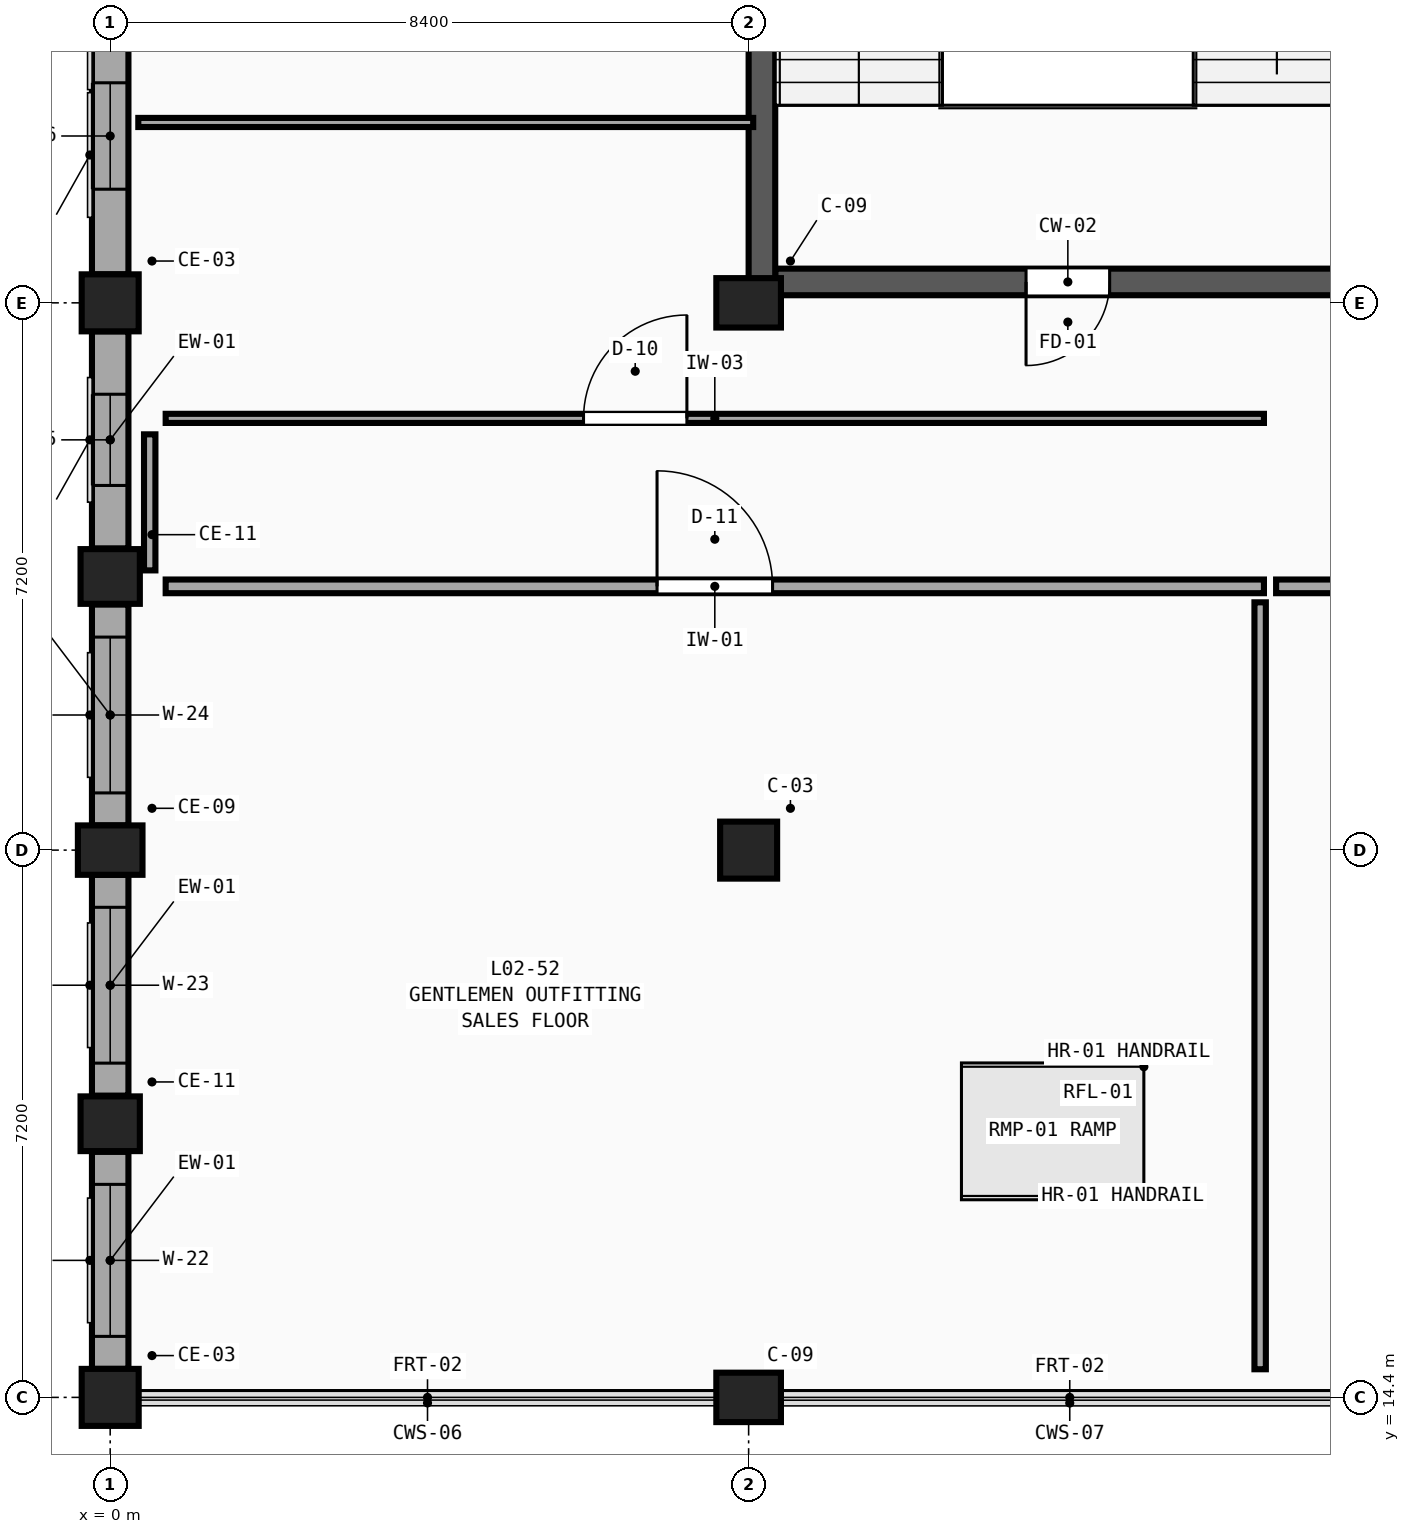
"""IFC4 building model, lengths in metres.
Left out: names, types, materials, properties, quantities, classifications, styles, units other than length and angle.
Written with IfcOpenShell. Run it as: python <this file> out.ifc"""

import sys

from ifc_helpers import new_model, si_unit, direction, frame, frame_2d, origin, origin_2d, place, context, subcontext, project, spatial, rectangle, extrude, element, fill, save


model = new_model("IFC4")
c1 = context("Model", 3, precision=1e-05, world=origin(), true_north=direction((0.0, 1.0)))
c2 = subcontext(c1, "Body", "Model", "MODEL_VIEW")
j1 = project(units=[si_unit("LENGTHUNIT", "METRE"), si_unit("PLANEANGLEUNIT", "RADIAN")], contexts=[c1])
p1 = place(None, origin())
s1 = spatial("IfcSite", under=j1, at=p1, CompositionType="ELEMENT")
p2 = place(p1, origin())
s2 = spatial("IfcBuilding", under=s1, at=p2, CompositionType="ELEMENT")
p3 = place(p2, frame((0.0, 0.0, 9.9)))
s3 = spatial("IfcBuildingStorey", under=s2, at=p3, CompositionType="ELEMENT", Elevation=9.9)
p4 = place(p3, frame((0.0, 14.4, 0.0), z_axis=(0.0, 0.0, 1.0), x_axis=(1.0, 0.0, 0.0)))
e1 = element("IfcColumn", 1, at=p4, inside=s3, PredefinedType="COLUMN", context=c2, shape_type="SweptSolid", body=[
    extrude(rectangle(XDim=0.75, YDim=0.75, at=origin_2d()), origin(), (0.0, 0.0, 1.0), 4.5),
])
p5 = place(p3, frame((0.0, 21.6, 0.0), z_axis=(0.0, 0.0, 1.0), x_axis=(1.0, 0.0, 0.0)))
e2 = element("IfcColumn", 2, at=p5, inside=s3, PredefinedType="COLUMN", context=c2, shape_type="SweptSolid", body=[
    extrude(rectangle(XDim=0.85, YDim=0.65, at=origin_2d()), origin(), (0.0, 0.0, 1.0), 4.5),
])
p6 = place(p3, frame((0.0, 28.8, 0.0), z_axis=(0.0, 0.0, 1.0), x_axis=(1.0, 0.0, 0.0)))
e3 = element("IfcColumn", 3, at=p6, inside=s3, PredefinedType="COLUMN", context=c2, shape_type="SweptSolid", body=[
    extrude(rectangle(XDim=0.75, YDim=0.75, at=origin_2d()), origin(), (0.0, 0.0, 1.0), 4.5),
])
p7 = place(p3, frame((8.4, 14.4, 0.0), z_axis=(0.0, 0.0, 1.0), x_axis=(1.0, 0.0, 0.0)))
e4 = element("IfcColumn", 4, at=p7, inside=s3, PredefinedType="COLUMN", context=c2, shape_type="SweptSolid", body=[
    extrude(rectangle(XDim=0.85, YDim=0.65, at=origin_2d()), origin(), (0.0, 0.0, 1.0), 4.5),
])
p8 = place(p3, frame((8.4, 21.6, 0.0), z_axis=(0.0, 0.0, 1.0), x_axis=(1.0, 0.0, 0.0)))
e5 = element("IfcColumn", 5, at=p8, inside=s3, PredefinedType="COLUMN", context=c2, shape_type="SweptSolid", body=[
    extrude(rectangle(XDim=0.75, YDim=0.75, at=origin_2d()), origin(), (0.0, 0.0, 1.0), 4.5),
])
p9 = place(p3, frame((8.4, 28.8, 0.0), z_axis=(0.0, 0.0, 1.0), x_axis=(1.0, 0.0, 0.0)))
e6 = element("IfcColumn", 6, at=p9, inside=s3, PredefinedType="COLUMN", context=c2, shape_type="SweptSolid", body=[
    extrude(rectangle(XDim=0.85, YDim=0.65, at=origin_2d()), origin(), (0.0, 0.0, 1.0), 4.5),
])
for number, where, z_axis, x_axis in (
    (7, (0.0, 18.0, 0.0), (0.0, 0.0, 1.0), (1.0, 0.0, 0.0)),
    (8, (0.0, 25.2, 0.0), (0.0, 0.0, 1.0), (1.0, 0.0, 0.0)),
):
    element("IfcColumn", number, at=place(p3, frame(where, z_axis=z_axis, x_axis=x_axis)), inside=s3, PredefinedType="PILASTER", context=c2, shape_type="SweptSolid", body=[
        extrude(rectangle(XDim=0.78, YDim=0.72, at=origin_2d()), origin(), (0.0, 0.0, 1.0), 4.5),
    ])
p10 = place(p3, frame((0.0, 14.775, 0.0), z_axis=(0.0, 0.0, 1.0), x_axis=(0.0, 1.0, 0.0)))
e9 = element("IfcWall", 9, at=p10, inside=s3, PredefinedType="SOLIDWALL", context=c2, shape_type="SweptSolid", body=[
    extrude(rectangle(XDim=2.855, YDim=0.48, at=frame_2d((1.427, 0.0))), origin(), (0.0, 0.0, 1.0), 3.63),
])
p11 = place(p10, frame((0.427, 0.0, 0.75)))
e10 = element("IfcOpeningElement", 10, at=p11, cuts=e9, PredefinedType="OPENING", context=c2, shape_type="SweptSolid", body=[
    extrude(rectangle(XDim=2.0, YDim=2.26, at=frame_2d((1.0, 1.13))), frame((0.0, 0.26, 0.0), z_axis=(0.0, -1.0, 0.0), x_axis=(1.0, 0.0, 0.0)), (0.0, 0.0, 1.0), 0.52),
])
p12 = place(p3, frame((0.0, 18.37, 0.0), z_axis=(0.0, 0.0, 1.0), x_axis=(0.0, 1.0, 0.0)))
e11 = element("IfcWall", 11, at=p12, inside=s3, PredefinedType="SOLIDWALL", context=c2, shape_type="SweptSolid", body=[
    extrude(rectangle(XDim=2.905, YDim=0.48, at=frame_2d((1.452, 0.0))), origin(), (0.0, 0.0, 1.0), 3.63),
])
p13 = place(p12, frame((0.427, 0.0, 0.75)))
e12 = element("IfcOpeningElement", 12, at=p13, cuts=e11, PredefinedType="OPENING", context=c2, shape_type="SweptSolid", body=[
    extrude(rectangle(XDim=2.05, YDim=2.26, at=frame_2d((1.025, 1.13))), frame((0.0, 0.26, 0.0), z_axis=(0.0, -1.0, 0.0), x_axis=(1.0, 0.0, 0.0)), (0.0, 0.0, 1.0), 0.52),
])
p14 = place(p3, frame((0.0, 21.925, 0.0), z_axis=(0.0, 0.0, 1.0), x_axis=(0.0, 1.0, 0.0)))
e13 = element("IfcWall", 13, at=p14, inside=s3, PredefinedType="SOLIDWALL", context=c2, shape_type="SweptSolid", body=[
    extrude(rectangle(XDim=2.905, YDim=0.48, at=frame_2d((1.453, 0.0))), origin(), (0.0, 0.0, 1.0), 3.63),
])
p15 = place(p14, frame((0.427, 0.0, 0.75)))
e14 = element("IfcOpeningElement", 14, at=p15, cuts=e13, PredefinedType="OPENING", context=c2, shape_type="SweptSolid", body=[
    extrude(rectangle(XDim=2.05, YDim=2.26, at=frame_2d((1.025, 1.13))), frame((0.0, 0.26, 0.0), z_axis=(0.0, -1.0, 0.0), x_axis=(1.0, 0.0, 0.0)), (0.0, 0.0, 1.0), 0.52),
])
p16 = place(p3, frame((0.0, 25.57, 0.0), z_axis=(0.0, 0.0, 1.0), x_axis=(0.0, 1.0, 0.0)))
e15 = element("IfcWall", 15, at=p16, inside=s3, PredefinedType="SOLIDWALL", context=c2, shape_type="SweptSolid", body=[
    extrude(rectangle(XDim=2.855, YDim=0.48, at=frame_2d((1.427, 0.0))), origin(), (0.0, 0.0, 1.0), 3.63),
])
p17 = place(p16, frame((0.827, 0.0, 0.75)))
e16 = element("IfcOpeningElement", 16, at=p17, cuts=e15, PredefinedType="OPENING", context=c2, shape_type="SweptSolid", body=[
    extrude(rectangle(XDim=1.2, YDim=2.44, at=frame_2d((0.6, 1.22))), frame((0.0, 0.26, 0.0), z_axis=(0.0, -1.0, 0.0), x_axis=(1.0, 0.0, 0.0)), (0.0, 0.0, 1.0), 0.52),
])
p18 = place(p3, frame((0.0, 29.175, 0.0), z_axis=(0.0, 0.0, 1.0), x_axis=(0.0, 1.0, 0.0)))
e17 = element("IfcWall", 17, at=p18, inside=s3, PredefinedType="SOLIDWALL", context=c2, shape_type="SweptSolid", body=[
    extrude(rectangle(XDim=6.5, YDim=0.48, at=frame_2d((3.25, 0.0))), origin(), (0.0, 0.0, 1.0), 3.63),
])
p19 = place(p18, frame((1.12, 0.0, 0.75)))
e18 = element("IfcOpeningElement", 18, at=p19, cuts=e17, PredefinedType="OPENING", context=c2, shape_type="SweptSolid", body=[
    extrude(rectangle(XDim=1.4, YDim=2.44, at=frame_2d((0.7, 1.22))), frame((0.0, 0.26, 0.0), z_axis=(0.0, -1.0, 0.0), x_axis=(1.0, 0.0, 0.0)), (0.0, 0.0, 1.0), 0.52),
])
p20 = place(p18, frame((3.88, 0.0, 0.75)))
e19 = element("IfcOpeningElement", 19, at=p20, cuts=e17, PredefinedType="OPENING", context=c2, shape_type="SweptSolid", body=[
    extrude(rectangle(XDim=1.6, YDim=2.44, at=frame_2d((0.8, 1.22))), frame((0.0, 0.26, 0.0), z_axis=(0.0, -1.0, 0.0), x_axis=(1.0, 0.0, 0.0)), (0.0, 0.0, 1.0), 0.52),
])
p21 = place(p3, frame((16.45, 29.075, 0.0), z_axis=(0.0, 0.0, 1.0), x_axis=(-1.0, 0.0, 0.0)))
e20 = element("IfcWall", 20, at=p21, inside=s3, PredefinedType="SHEAR", context=c2, shape_type="SweptSolid", body=[
    extrude(rectangle(XDim=7.7, YDim=0.35, at=frame_2d((3.85, 0.0))), origin(), (0.0, 0.0, 1.0), 4.5),
])
p22 = place(p21, frame((3.3, 0.0, 0.0)))
e21 = element("IfcOpeningElement", 21, at=p22, cuts=e20, PredefinedType="OPENING", context=c2, shape_type="SweptSolid", body=[
    extrude(rectangle(XDim=1.1, YDim=2.2, at=frame_2d((0.55, 1.1))), frame((0.0, 0.195, 0.0), z_axis=(0.0, -1.0, 0.0), x_axis=(1.0, 0.0, 0.0)), (0.0, 0.0, 1.0), 0.39),
])
p23 = place(p3, frame((8.575, 37.25, 0.0), z_axis=(0.0, 0.0, 1.0), x_axis=(0.0, -1.0, 0.0)))
e22 = element("IfcWall", 22, at=p23, inside=s3, PredefinedType="SHEAR", context=c2, shape_type="SweptSolid", body=[
    extrude(rectangle(XDim=8.35, YDim=0.35, at=frame_2d((4.175, 0.0))), origin(), (0.0, 0.0, 1.0), 4.5),
])
p24 = place(p3, frame((0.73, 27.28, 0.0), z_axis=(0.0, 0.0, 1.0), x_axis=(1.0, 0.0, 0.0)))
e23 = element("IfcWall", 23, at=p24, inside=s3, PredefinedType="PARTITIONING", context=c2, shape_type="SweptSolid", body=[
    extrude(rectangle(XDim=14.45, YDim=0.12, at=frame_2d((7.225, 0.0))), origin(), (0.0, 0.0, 1.0), 4.18),
])
p25 = place(p24, frame((5.498, 0.0, 0.0)))
e24 = element("IfcOpeningElement", 24, at=p25, cuts=e23, PredefinedType="OPENING", context=c2, shape_type="SweptSolid", body=[
    extrude(rectangle(XDim=1.36, YDim=2.13, at=frame_2d((0.68, 1.065))), frame((0.0, 0.08, 0.0), z_axis=(0.0, -1.0, 0.0), x_axis=(1.0, 0.0, 0.0)), (0.0, 0.0, 1.0), 0.16),
])
p26 = place(p3, frame((0.73, 25.07, 0.0), z_axis=(0.0, 0.0, 1.0), x_axis=(1.0, 0.0, 0.0)))
e25 = element("IfcWall", 25, at=p26, inside=s3, PredefinedType="PARTITIONING", context=c2, shape_type="SweptSolid", body=[
    extrude(rectangle(XDim=14.45, YDim=0.18, at=frame_2d((7.225, 0.0))), origin(), (0.0, 0.0, 1.0), 4.18),
])
p27 = place(p26, frame((6.465, 0.0, 0.0)))
e26 = element("IfcOpeningElement", 26, at=p27, cuts=e25, PredefinedType="OPENING", context=c2, shape_type="SweptSolid", body=[
    extrude(rectangle(XDim=1.52, YDim=2.13, at=frame_2d((0.76, 1.065))), frame((0.0, 0.11, 0.0), z_axis=(0.0, -1.0, 0.0), x_axis=(1.0, 0.0, 0.0)), (0.0, 0.0, 1.0), 0.22),
])
p28 = place(p3, frame((15.34, 25.07, 0.0), z_axis=(0.0, 0.0, 1.0), x_axis=(1.0, 0.0, 0.0)))
e27 = element("IfcWall", 27, at=p28, inside=s3, PredefinedType="PARTITIONING", context=c2, shape_type="SweptSolid", body=[
    extrude(rectangle(XDim=4.27, YDim=0.18, at=frame_2d((2.135, 0.0))), origin(), (0.0, 0.0, 1.0), 4.18),
])
p29 = place(p28, frame((2.649, 0.0, 0.0)))
e28 = element("IfcOpeningElement", 28, at=p29, cuts=e27, PredefinedType="OPENING", context=c2, shape_type="SweptSolid", body=[
    extrude(rectangle(XDim=1.04, YDim=2.05, at=frame_2d((0.52, 1.025))), frame((0.0, 0.11, 0.0), z_axis=(0.0, -1.0, 0.0), x_axis=(1.0, 0.0, 0.0)), (0.0, 0.0, 1.0), 0.22),
])
p30 = place(p3, frame((0.52, 25.28, 0.0), z_axis=(0.0, 0.0, 1.0), x_axis=(0.0, 1.0, 0.0)))
e29 = element("IfcWall", 29, at=p30, inside=s3, PredefinedType="PARTITIONING", context=c2, shape_type="SweptSolid", body=[
    extrude(rectangle(XDim=1.79, YDim=0.15, at=frame_2d((0.895, 0.0))), origin(), (0.0, 0.0, 1.0), 3.63),
])
p31 = place(p3, frame((15.13, 14.77, 0.0), z_axis=(0.0, 0.0, 1.0), x_axis=(0.0, 1.0, 0.0)))
e30 = element("IfcWall", 30, at=p31, inside=s3, PredefinedType="PARTITIONING", context=c2, shape_type="SweptSolid", body=[
    extrude(rectangle(XDim=10.09, YDim=0.15, at=frame_2d((5.045, 0.0))), origin(), (0.0, 0.0, 1.0), 4.18),
])
p32 = place(p3, frame((0.37, 31.173, 0.0), z_axis=(0.0, 0.0, 1.0), x_axis=(1.0, 0.0, 0.0)))
e31 = element("IfcWall", 31, at=p32, inside=s3, PredefinedType="PARTITIONING", context=c2, shape_type="SweptSolid", body=[
    extrude(rectangle(XDim=8.09, YDim=0.12, at=frame_2d((4.045, 0.0))), origin(), (0.0, 0.0, 1.0), 4.18),
])
p33 = place(p11, origin())
e32 = element("IfcWindow", 32, at=p33, inside=s3, PartitioningType="TRIPLE_PANEL_VERTICAL", PredefinedType="WINDOW", context=c2, shape_type="SweptSolid", body=[
    extrude(rectangle(XDim=2.0, YDim=2.26, at=frame_2d((1.0, 1.13))), frame((0.0, 0.03, 0.0), z_axis=(0.0, -1.0, 0.0), x_axis=(1.0, 0.0, 0.0)), (0.0, 0.0, 1.0), 0.06),
])
fill(e10, e32)
p34 = place(p13, origin())
e33 = element("IfcWindow", 33, at=p34, inside=s3, PartitioningType="TRIPLE_PANEL_VERTICAL", PredefinedType="WINDOW", context=c2, shape_type="SweptSolid", body=[
    extrude(rectangle(XDim=2.05, YDim=2.26, at=frame_2d((1.025, 1.13))), frame((0.0, 0.03, 0.0), z_axis=(0.0, -1.0, 0.0), x_axis=(1.0, 0.0, 0.0)), (0.0, 0.0, 1.0), 0.06),
])
fill(e12, e33)
p35 = place(p15, origin())
e34 = element("IfcWindow", 34, at=p35, inside=s3, PartitioningType="TRIPLE_PANEL_VERTICAL", PredefinedType="WINDOW", context=c2, shape_type="SweptSolid", body=[
    extrude(rectangle(XDim=2.05, YDim=2.26, at=frame_2d((1.025, 1.13))), frame((0.0, 0.03, 0.0), z_axis=(0.0, -1.0, 0.0), x_axis=(1.0, 0.0, 0.0)), (0.0, 0.0, 1.0), 0.06),
])
fill(e14, e34)
p36 = place(p17, origin())
e35 = element("IfcWindow", 35, at=p36, inside=s3, PartitioningType="SINGLE_PANEL", PredefinedType="WINDOW", context=c2, shape_type="SweptSolid", body=[
    extrude(rectangle(XDim=1.2, YDim=2.44, at=frame_2d((0.6, 1.22))), frame((0.0, 0.03, 0.0), z_axis=(0.0, -1.0, 0.0), x_axis=(1.0, 0.0, 0.0)), (0.0, 0.0, 1.0), 0.06),
])
fill(e16, e35)
p37 = place(p19, origin())
e36 = element("IfcWindow", 36, at=p37, inside=s3, PartitioningType="DOUBLE_PANEL_VERTICAL", PredefinedType="WINDOW", context=c2, shape_type="SweptSolid", body=[
    extrude(rectangle(XDim=1.4, YDim=2.44, at=frame_2d((0.7, 1.22))), frame((0.0, 0.03, 0.0), z_axis=(0.0, -1.0, 0.0), x_axis=(1.0, 0.0, 0.0)), (0.0, 0.0, 1.0), 0.06),
])
fill(e18, e36)
p38 = place(p22, origin())
e37 = element("IfcDoor", 37, at=p38, inside=s3, OperationType="SINGLE_SWING_RIGHT", PredefinedType="DOOR", context=c2, shape_type="SweptSolid", body=[
    extrude(rectangle(XDim=1.1, YDim=2.2, at=frame_2d((0.55, 1.1))), frame((0.0, 0.025, 0.0), z_axis=(0.0, -1.0, 0.0), x_axis=(1.0, 0.0, 0.0)), (0.0, 0.0, 1.0), 0.05),
])
fill(e21, e37)
p39 = place(p25, origin())
e38 = element("IfcDoor", 38, at=p39, inside=s3, OperationType="SINGLE_SWING_RIGHT", PredefinedType="DOOR", context=c2, shape_type="SweptSolid", body=[
    extrude(rectangle(XDim=1.36, YDim=2.13, at=frame_2d((0.68, 1.065))), frame((0.0, 0.025, 0.0), z_axis=(0.0, -1.0, 0.0), x_axis=(1.0, 0.0, 0.0)), (0.0, 0.0, 1.0), 0.05),
])
fill(e24, e38)
p40 = place(p27, origin())
e39 = element("IfcDoor", 39, at=p40, inside=s3, OperationType="SINGLE_SWING_LEFT", PredefinedType="DOOR", context=c2, shape_type="SweptSolid", body=[
    extrude(rectangle(XDim=1.52, YDim=2.13, at=frame_2d((0.76, 1.065))), frame((0.0, 0.025, 0.0), z_axis=(0.0, -1.0, 0.0), x_axis=(1.0, 0.0, 0.0)), (0.0, 0.0, 1.0), 0.05),
])
fill(e26, e39)
save(model, sys.argv[1])
